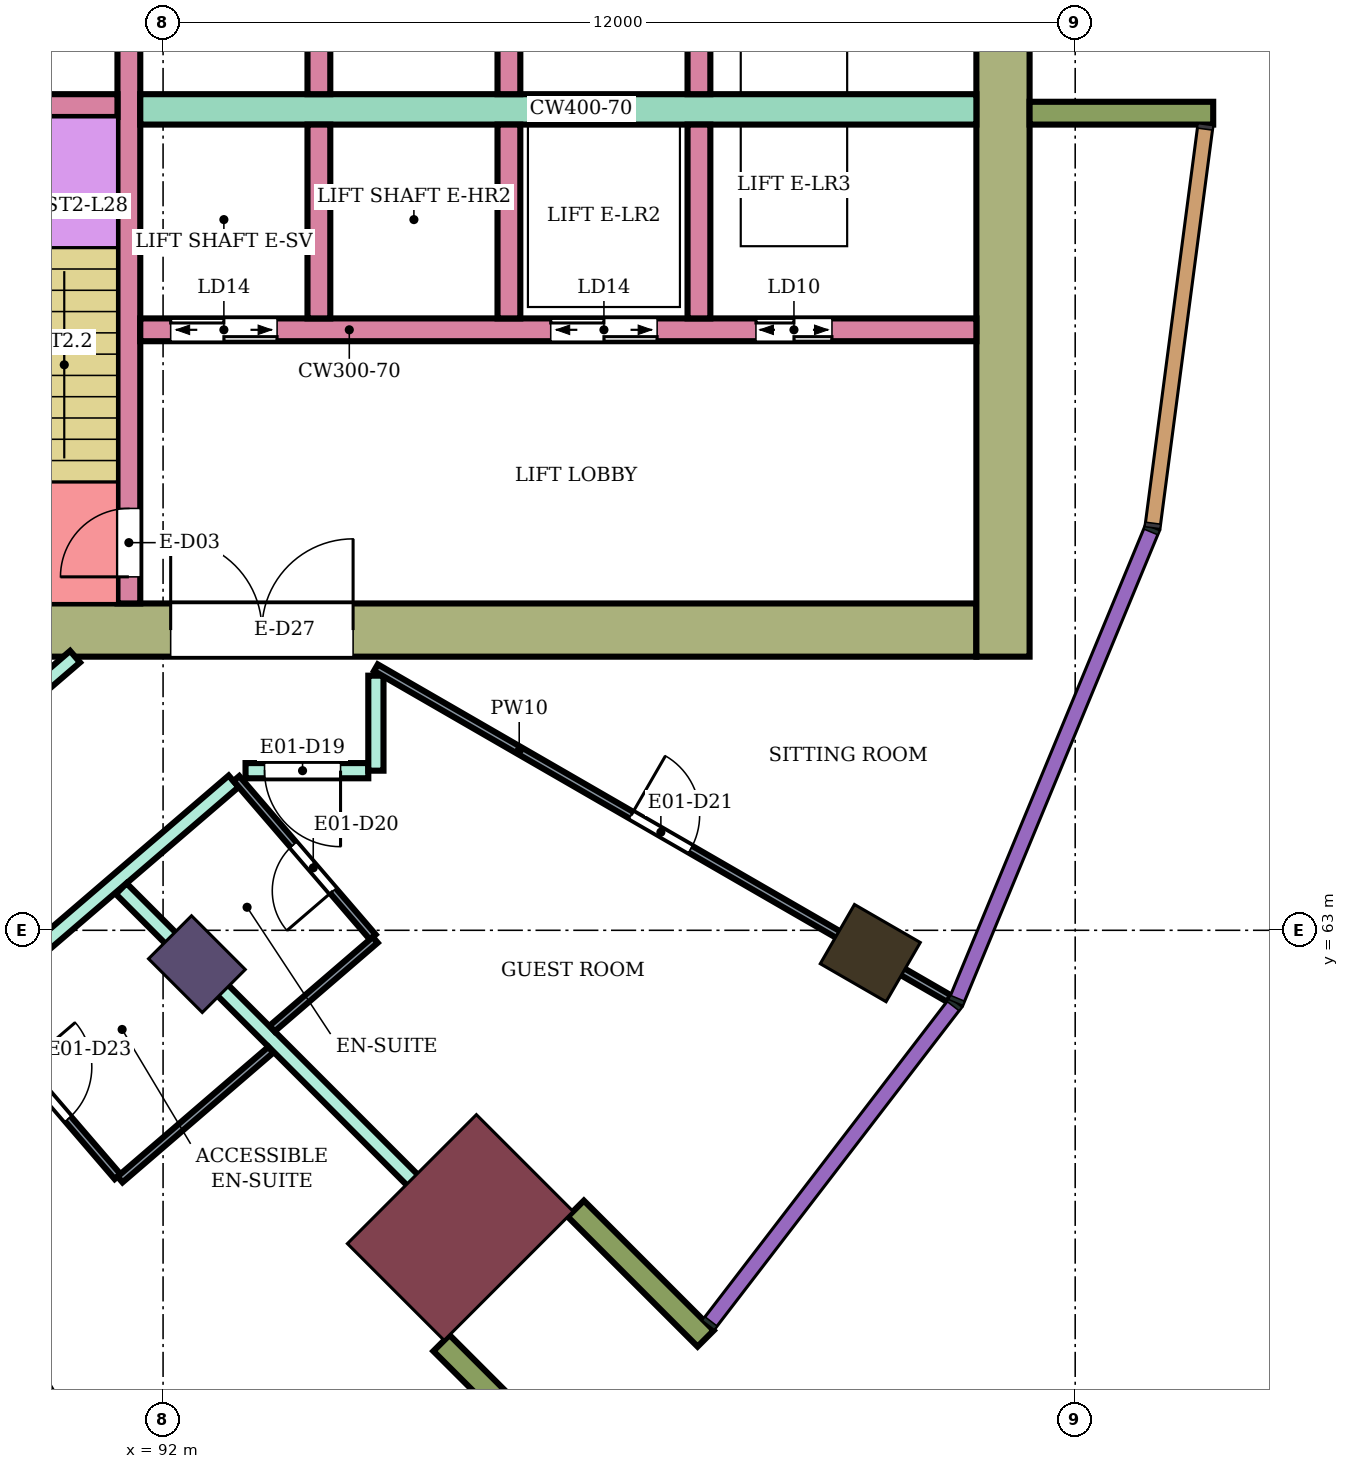
"""IFC4 building model, lengths in metres.
Left out: names, types, materials, properties, quantities, classifications, styles, units other than length and angle.
Written with IfcOpenShell. Run it as: python <this file> out.ifc"""

import sys

from ifc_helpers import new_model, si_unit, direction, frame, frame_2d, origin, origin_2d, place, context, subcontext, project, spatial, rectangle, extrude, element, fill, save


model = new_model("IFC4")
c1 = context("Model", 3, precision=1e-05, world=origin(), true_north=direction((0.0, 1.0)))
c2 = subcontext(c1, "Body", "Model", "MODEL_VIEW")
j1 = project(units=[si_unit("LENGTHUNIT", "METRE"), si_unit("PLANEANGLEUNIT", "RADIAN")], contexts=[c1])
p1 = place(None, origin())
s1 = spatial("IfcSite", under=j1, at=p1, CompositionType="ELEMENT")
p2 = place(p1, origin())
s2 = spatial("IfcBuilding", under=s1, at=p2, CompositionType="ELEMENT")
p3 = place(p2, frame((0.0, 0.0, 122.4)))
s3 = spatial("IfcBuildingStorey", under=s2, at=p3, CompositionType="ELEMENT", Elevation=122.4)
p4 = place(p3, frame((101.304, 62.7, 0.0), z_axis=(0.0, 0.0, 1.0), x_axis=(0.866025403784, -0.5, 0.0)))
e1 = element("IfcColumn", 1, at=p4, inside=s3, PredefinedType="COLUMN", context=c2, shape_type="SweptSolid", body=[
    extrude(rectangle(XDim=1.0, YDim=0.9, at=origin_2d()), origin(), (0.0, 0.0, 1.0), 3.9),
])
p5 = place(p3, frame((92.445, 62.555, 0.0), z_axis=(0.0, 0.0, 1.0), x_axis=(0.707106781187, -0.707106781187, 0.0)))
e2 = element("IfcColumn", 2, at=p5, inside=s3, PredefinedType="COLUMN", context=c2, shape_type="SweptSolid", body=[
    extrude(rectangle(XDim=1.0, YDim=0.8, at=origin_2d()), origin(), (0.0, 0.0, 1.0), 3.9),
])
p6 = place(p3, frame((95.91, 59.09, 0.0), z_axis=(0.0, 0.0, 1.0), x_axis=(0.707106781187, -0.707106781187, 0.0)))
e3 = element("IfcColumn", 3, at=p6, inside=s3, PredefinedType="COLUMN", context=c2, shape_type="SweptSolid", body=[
    extrude(rectangle(XDim=1.8, YDim=2.4, at=origin_2d()), origin(), (0.0, 0.0, 1.0), 3.9),
])
p7 = place(p3, frame((87.9, 66.95, 0.0), z_axis=(0.0, 0.0, 1.0), x_axis=(1.0, 0.0, 0.0)))
e4 = element("IfcWall", 4, at=p7, inside=s3, PredefinedType="SHEAR", context=c2, shape_type="SweptSolid", body=[
    extrude(rectangle(XDim=14.8, YDim=0.7, at=frame_2d((7.4, 0.0))), origin(), (0.0, 0.0, 1.0), 3.58),
])
p8 = place(p7, frame((4.2, 0.0, 0.0)))
e5 = element("IfcOpeningElement", 5, at=p8, cuts=e4, PredefinedType="OPENING", context=c2, shape_type="SweptSolid", body=[
    extrude(rectangle(XDim=2.4, YDim=2.4, at=frame_2d((1.2, 1.2))), frame((0.0, 0.36, 0.0), z_axis=(0.0, -1.0, 0.0), x_axis=(1.0, 0.0, 0.0)), (0.0, 0.0, 1.0), 0.72),
])
p9 = place(p3, frame((103.05, 66.6, 0.0), z_axis=(0.0, 0.0, 1.0), x_axis=(0.0, 1.0, 0.0)))
e6 = element("IfcWall", 6, at=p9, inside=s3, PredefinedType="SHEAR", context=c2, shape_type="SweptSolid", body=[
    extrude(rectangle(XDim=16.8, YDim=0.7, at=frame_2d((8.4, 0.0))), origin(), (0.0, 0.0, 1.0), 3.58),
])
p10 = place(p3, frame((91.55, 67.3, 0.0), z_axis=(0.0, 0.0, 1.0), x_axis=(0.0, 1.0, 0.0)))
e7 = element("IfcWall", 7, at=p10, inside=s3, PredefinedType="SHEAR", context=c2, shape_type="SweptSolid", body=[
    extrude(rectangle(XDim=7.7, YDim=0.3, at=frame_2d((3.85, 0.0))), origin(), (0.0, 0.0, 1.0), 3.58),
])
p11 = place(p10, frame((0.35, 0.0, 0.0)))
e8 = element("IfcOpeningElement", 8, at=p11, cuts=e7, PredefinedType="OPENING", context=c2, shape_type="SweptSolid", body=[
    extrude(rectangle(XDim=0.9, YDim=2.1, at=frame_2d((0.45, 1.05))), frame((0.0, 0.16, 0.0), z_axis=(0.0, -1.0, 0.0), x_axis=(1.0, 0.0, 0.0)), (0.0, 0.0, 1.0), 0.32),
])
p12 = place(p3, frame((88.35, 73.85, 0.0), z_axis=(0.0, 0.0, 1.0), x_axis=(1.0, 0.0, 0.0)))
e9 = element("IfcWall", 9, at=p12, inside=s3, PredefinedType="SHEAR", context=c2, shape_type="SweptSolid", body=[
    extrude(rectangle(XDim=3.05, YDim=0.3, at=frame_2d((1.525, 0.0))), origin(), (0.0, 0.0, 1.0), 3.58),
])
p13 = place(p3, frame((91.7, 73.8, 0.0), z_axis=(0.0, 0.0, 1.0), x_axis=(1.0, 0.0, 0.0)))
e10 = element("IfcWall", 10, at=p13, inside=s3, PredefinedType="SHEAR", context=c2, shape_type="SweptSolid", body=[
    extrude(rectangle(XDim=11.0, YDim=0.4, at=frame_2d((5.5, 0.0))), origin(), (0.0, 0.0, 1.0), 3.58),
])
p14 = place(p3, frame((91.7, 70.9, 0.0), z_axis=(0.0, 0.0, 1.0), x_axis=(1.0, 0.0, 0.0)))
e11 = element("IfcWall", 11, at=p14, inside=s3, PredefinedType="SHEAR", context=c2, shape_type="SweptSolid", body=[
    extrude(rectangle(XDim=11.0, YDim=0.3, at=frame_2d((5.5, 0.0))), origin(), (0.0, 0.0, 1.0), 3.58),
])
p15 = place(p14, frame((0.4, 0.0, 0.0)))
e12 = element("IfcOpeningElement", 12, at=p15, cuts=e11, PredefinedType="OPENING", context=c2, shape_type="SweptSolid", body=[
    extrude(rectangle(XDim=1.4, YDim=2.1, at=frame_2d((0.7, 1.05))), frame((0.0, 0.16, 0.0), z_axis=(0.0, -1.0, 0.0), x_axis=(1.0, 0.0, 0.0)), (0.0, 0.0, 1.0), 0.32),
])
p16 = place(p14, frame((5.4, 0.0, 0.0)))
e13 = element("IfcOpeningElement", 13, at=p16, cuts=e11, PredefinedType="OPENING", context=c2, shape_type="SweptSolid", body=[
    extrude(rectangle(XDim=1.4, YDim=2.1, at=frame_2d((0.7, 1.05))), frame((0.0, 0.16, 0.0), z_axis=(0.0, -1.0, 0.0), x_axis=(1.0, 0.0, 0.0)), (0.0, 0.0, 1.0), 0.32),
])
p17 = place(p14, frame((8.1, 0.0, 0.0)))
e14 = element("IfcOpeningElement", 14, at=p17, cuts=e11, PredefinedType="OPENING", context=c2, shape_type="SweptSolid", body=[
    extrude(rectangle(XDim=1.0, YDim=2.1, at=frame_2d((0.5, 1.05))), frame((0.0, 0.16, 0.0), z_axis=(0.0, -1.0, 0.0), x_axis=(1.0, 0.0, 0.0)), (0.0, 0.0, 1.0), 0.32),
])
for number, where, z_axis, x_axis in (
    (15, (94.05, 74.0, 0.0), (0.0, 0.0, 1.0), (0.0, 1.0, 0.0)),
    (16, (96.55, 74.0, 0.0), (0.0, 0.0, 1.0), (0.0, 1.0, 0.0)),
    (17, (99.05, 74.0, 0.0), (0.0, 0.0, 1.0), (0.0, 1.0, 0.0)),
    (18, (94.05, 71.05, 0.0), (0.0, 0.0, 1.0), (0.0, 1.0, 0.0)),
    (19, (96.55, 71.05, 0.0), (0.0, 0.0, 1.0), (0.0, 1.0, 0.0)),
    (20, (99.05, 71.05, 0.0), (0.0, 0.0, 1.0), (0.0, 1.0, 0.0)),
):
    element("IfcWall", number, at=place(p3, frame(where, z_axis=z_axis, x_axis=x_axis)), inside=s3, PredefinedType="SHEAR", context=c2, shape_type="SweptSolid", body=[
        extrude(rectangle(XDim=2.55, YDim=0.3, at=frame_2d((1.275, 0.0))), origin(), (0.0, 0.0, 1.0), 3.58),
    ])
for number, where, z_axis, x_axis in (
    (21, (103.4, 73.75, 0.0), (0.0, 0.0, 1.0), (1.0, 0.0, 0.0)),
    (22, (95.662, 57.57, 0.0), (0.0, 0.0, 1.0), (0.707, -0.707, 0.0)),
    (23, (97.43, 59.338, 0.0), (0.0, 0.0, 1.0), (0.707, -0.707, 0.0)),
):
    element("IfcWall", number, at=place(p3, frame(where, z_axis=z_axis, x_axis=x_axis)), inside=s3, PredefinedType="NOTDEFINED", context=c2, shape_type="SweptSolid", body=[
        extrude(rectangle(XDim=2.416, YDim=0.3, at=frame_2d((1.208, 0.0))), origin(), (0.0, 0.0, 1.0), 3.9),
    ])
p18 = place(p3, frame((86.877, 63.189, 0.0), z_axis=(0.0, 0.0, 1.0), x_axis=(0.758075808328, 0.652166442581, 0.0)))
e24 = element("IfcWall", 24, at=p18, inside=s3, PredefinedType="PARTITIONING", context=c2, shape_type="SweptSolid", body=[
    extrude(rectangle(XDim=5.23, YDim=0.2, at=frame_2d((2.615, 0.0))), origin(), (0.0, 0.0, 1.0), 3.45),
])
p19 = place(p18, frame((2.165, 0.0, 0.0)))
e25 = element("IfcOpeningElement", 25, at=p19, cuts=e24, PredefinedType="OPENING", context=c2, shape_type="SweptSolid", body=[
    extrude(rectangle(XDim=0.9, YDim=2.1, at=frame_2d((0.45, 1.05))), frame((0.0, 0.11, 0.0), z_axis=(0.0, -1.0, 0.0), x_axis=(1.0, 0.0, 0.0)), (0.0, 0.0, 1.0), 0.22),
])
p20 = place(p3, frame((88.235, 60.931, 0.0), z_axis=(0.0, 0.0, 1.0), x_axis=(0.758816241808, 0.651304775945, 0.0)))
e26 = element("IfcWall", 26, at=p20, inside=s3, PredefinedType="PARTITIONING", context=c2, shape_type="SweptSolid", body=[
    extrude(rectangle(XDim=6.186, YDim=0.2, at=frame_2d((3.093, 0.0))), origin(), (0.0, 0.0, 1.0), 3.45),
])
p21 = place(p20, frame((0.308, 0.0, 0.0)))
e27 = element("IfcOpeningElement", 27, at=p21, cuts=e26, PredefinedType="OPENING", context=c2, shape_type="SweptSolid", body=[
    extrude(rectangle(XDim=1.1, YDim=2.1, at=frame_2d((0.55, 1.05))), frame((0.0, 0.11, 0.0), z_axis=(0.0, -1.0, 0.0), x_axis=(1.0, 0.0, 0.0)), (0.0, 0.0, 1.0), 0.22),
])
p22 = place(p3, frame((88.159, 60.863, 0.0), z_axis=(0.0, 0.0, 1.0), x_axis=(0.499935840196, -0.866062443296, 0.0)))
e28 = element("IfcWall", 28, at=p22, inside=s3, PredefinedType="PARTITIONING", context=c2, shape_type="SweptSolid", body=[
    extrude(rectangle(XDim=9.475, YDim=0.2, at=frame_2d((4.737, 0.0))), origin(), (0.0, 0.0, 1.0), 3.45),
])
p23 = place(p3, frame((91.449, 63.548, 0.0), z_axis=(0.0, 0.0, 1.0), x_axis=(0.706984804638, -0.707228736698, 0.0)))
e29 = element("IfcWall", 29, at=p23, inside=s3, PredefinedType="PARTITIONING", context=c2, shape_type="SweptSolid", body=[
    extrude(rectangle(XDim=7.006, YDim=0.2, at=frame_2d((3.503, 0.0))), origin(), (0.0, 0.0, 1.0), 3.45),
])
p24 = place(p3, frame((93.085, 65.1, 0.0), z_axis=(0.0, 0.0, 1.0), x_axis=(1.0, 0.0, 0.0)))
e30 = element("IfcWall", 30, at=p24, inside=s3, PredefinedType="PARTITIONING", context=c2, shape_type="SweptSolid", body=[
    extrude(rectangle(XDim=1.615, YDim=0.2, at=frame_2d((0.808, 0.0))), origin(), (0.0, 0.0, 1.0), 3.45),
])
p25 = place(p24, frame((0.25, 0.0, 0.0)))
e31 = element("IfcOpeningElement", 31, at=p25, cuts=e30, PredefinedType="OPENING", context=c2, shape_type="SweptSolid", body=[
    extrude(rectangle(XDim=1.0, YDim=2.1, at=frame_2d((0.5, 1.05))), frame((0.0, 0.11, 0.0), z_axis=(0.0, -1.0, 0.0), x_axis=(1.0, 0.0, 0.0)), (0.0, 0.0, 1.0), 0.22),
])
p26 = place(p3, frame((94.8, 65.1, 0.0), z_axis=(0.0, 0.0, 1.0), x_axis=(0.0, 1.0, 0.0)))
e32 = element("IfcWall", 32, at=p26, inside=s3, PredefinedType="PARTITIONING", context=c2, shape_type="SweptSolid", body=[
    extrude(rectangle(XDim=1.25, YDim=0.2, at=frame_2d((0.625, 0.0))), origin(), (0.0, 0.0, 1.0), 3.45),
])
p27 = place(p3, frame((89.543, 61.921, 0.0), z_axis=(0.0, 0.0, 1.0), x_axis=(0.651996917864, -0.758221616083, 0.0)))
e33 = element("IfcWall", 33, at=p27, inside=s3, PredefinedType="PARTITIONING", context=c2, shape_type="SweptSolid", body=[
    extrude(rectangle(XDim=2.85, YDim=0.1, at=frame_2d((1.425, 0.0))), origin(), (0.0, 0.0, 1.0), 3.45),
])
p28 = place(p27, frame((0.95, 0.0, 0.0)))
e34 = element("IfcOpeningElement", 34, at=p28, cuts=e33, PredefinedType="OPENING", context=c2, shape_type="SweptSolid", body=[
    extrude(rectangle(XDim=0.9, YDim=2.1, at=frame_2d((0.45, 1.05))), frame((0.0, 0.06, 0.0), z_axis=(0.0, -1.0, 0.0), x_axis=(1.0, 0.0, 0.0)), (0.0, 0.0, 1.0), 0.12),
])
p29 = place(p3, frame((91.434, 59.722, 0.0), z_axis=(0.0, 0.0, 1.0), x_axis=(0.758076316785, 0.652165851552, 0.0)))
e35 = element("IfcWall", 35, at=p29, inside=s3, PredefinedType="PARTITIONING", context=c2, shape_type="SweptSolid", body=[
    extrude(rectangle(XDim=2.616, YDim=0.1, at=frame_2d((1.308, 0.0))), origin(), (0.0, 0.0, 1.0), 3.45),
])
p30 = place(p3, frame((92.965, 64.997, 0.0), z_axis=(0.0, 0.0, 1.0), x_axis=(0.652069888227, -0.758158862553, 0.0)))
e36 = element("IfcWall", 36, at=p30, inside=s3, PredefinedType="PARTITIONING", context=c2, shape_type="SweptSolid", body=[
    extrude(rectangle(XDim=2.75, YDim=0.1, at=frame_2d((1.375, 0.0))), origin(), (0.0, 0.0, 1.0), 3.45),
])
p31 = place(p30, frame((1.15, 0.0, 0.0)))
e37 = element("IfcOpeningElement", 37, at=p31, cuts=e36, PredefinedType="OPENING", context=c2, shape_type="SweptSolid", body=[
    extrude(rectangle(XDim=0.8, YDim=2.1, at=frame_2d((0.4, 1.05))), frame((0.0, 0.06, 0.0), z_axis=(0.0, -1.0, 0.0), x_axis=(1.0, 0.0, 0.0)), (0.0, 0.0, 1.0), 0.12),
])
p32 = place(p3, frame((93.435, 61.707, 0.0), z_axis=(0.0, 0.0, 1.0), x_axis=(0.758070495124, 0.652172618578, 0.0)))
e38 = element("IfcWall", 38, at=p32, inside=s3, PredefinedType="PARTITIONING", context=c2, shape_type="SweptSolid", body=[
    extrude(rectangle(XDim=1.789, YDim=0.1, at=frame_2d((0.895, 0.0))), origin(), (0.0, 0.0, 1.0), 3.45),
])
p33 = place(p3, frame((94.8, 66.455, 0.0), z_axis=(0.0, 0.0, 1.0), x_axis=(0.86602264145, -0.500004784474, 0.0)))
e39 = element("IfcWall", 39, at=p33, inside=s3, PredefinedType="PARTITIONING", context=c2, shape_type="SweptSolid", body=[
    extrude(rectangle(XDim=8.708, YDim=0.1, at=frame_2d((4.354, 0.0))), origin(), (0.0, 0.0, 1.0), 3.45),
])
p34 = place(p33, frame((3.879, 0.0, 0.0)))
e40 = element("IfcOpeningElement", 40, at=p34, cuts=e39, PredefinedType="OPENING", context=c2, shape_type="SweptSolid", body=[
    extrude(rectangle(XDim=0.9, YDim=2.1, at=frame_2d((0.45, 1.05))), frame((0.0, 0.06, 0.0), z_axis=(0.0, -1.0, 0.0), x_axis=(1.0, 0.0, 0.0)), (0.0, 0.0, 1.0), 0.12),
])
p35 = place(p25, frame((1.0, 0.0, 0.0), z_axis=(0.0, 0.0, 1.0), x_axis=(-1.0, 0.0, 0.0)))
e41 = element("IfcDoor", 41, at=p35, inside=s3, OperationType="SINGLE_SWING_LEFT", PredefinedType="DOOR", context=c2, shape_type="SweptSolid", body=[
    extrude(rectangle(XDim=1.0, YDim=2.1, at=frame_2d((0.5, 1.05))), frame((0.0, 0.025, 0.0), z_axis=(0.0, -1.0, 0.0), x_axis=(1.0, 0.0, 0.0)), (0.0, 0.0, 1.0), 0.05),
])
fill(e31, e41)
p36 = place(p31, frame((0.8, 0.0, 0.0), z_axis=(0.0, 0.0, 1.0), x_axis=(-1.0, 0.0, 0.0)))
e42 = element("IfcDoor", 42, at=p36, inside=s3, OperationType="SINGLE_SWING_LEFT", PredefinedType="DOOR", context=c2, shape_type="SweptSolid", body=[
    extrude(rectangle(XDim=0.8, YDim=2.1, at=frame_2d((0.4, 1.05))), frame((0.0, 0.025, 0.0), z_axis=(0.0, -1.0, 0.0), x_axis=(1.0, 0.0, 0.0)), (0.0, 0.0, 1.0), 0.05),
])
fill(e37, e42)
p37 = place(p34, origin())
e43 = element("IfcDoor", 43, at=p37, inside=s3, OperationType="SINGLE_SWING_LEFT", PredefinedType="DOOR", context=c2, shape_type="SweptSolid", body=[
    extrude(rectangle(XDim=0.9, YDim=2.1, at=frame_2d((0.45, 1.05))), frame((0.0, 0.025, 0.0), z_axis=(0.0, -1.0, 0.0), x_axis=(1.0, 0.0, 0.0)), (0.0, 0.0, 1.0), 0.05),
])
fill(e40, e43)
p38 = place(p28, origin())
e44 = element("IfcDoor", 44, at=p38, inside=s3, OperationType="SINGLE_SWING_LEFT", PredefinedType="DOOR", context=c2, shape_type="SweptSolid", body=[
    extrude(rectangle(XDim=0.9, YDim=2.1, at=frame_2d((0.45, 1.05))), frame((0.0, 0.025, 0.0), z_axis=(0.0, -1.0, 0.0), x_axis=(1.0, 0.0, 0.0)), (0.0, 0.0, 1.0), 0.05),
])
fill(e34, e44)
p39 = place(p11, origin())
e45 = element("IfcDoor", 45, at=p39, inside=s3, OperationType="SINGLE_SWING_LEFT", PredefinedType="DOOR", context=c2, shape_type="SweptSolid", body=[
    extrude(rectangle(XDim=0.9, YDim=2.1, at=frame_2d((0.45, 1.05))), frame((0.0, 0.025, 0.0), z_axis=(0.0, -1.0, 0.0), x_axis=(1.0, 0.0, 0.0)), (0.0, 0.0, 1.0), 0.05),
])
fill(e8, e45)
p40 = place(p15, origin())
e46 = element("IfcDoor", 46, at=p40, inside=s3, OperationType="DOUBLE_DOOR_SLIDING", PredefinedType="DOOR", context=c2, shape_type="SweptSolid", body=[
    extrude(rectangle(XDim=1.4, YDim=2.1, at=frame_2d((0.7, 1.05))), frame((0.0, 0.025, 0.0), z_axis=(0.0, -1.0, 0.0), x_axis=(1.0, 0.0, 0.0)), (0.0, 0.0, 1.0), 0.05),
])
fill(e12, e46)
p41 = place(p16, origin())
e47 = element("IfcDoor", 47, at=p41, inside=s3, OperationType="DOUBLE_DOOR_SLIDING", PredefinedType="DOOR", context=c2, shape_type="SweptSolid", body=[
    extrude(rectangle(XDim=1.4, YDim=2.1, at=frame_2d((0.7, 1.05))), frame((0.0, 0.025, 0.0), z_axis=(0.0, -1.0, 0.0), x_axis=(1.0, 0.0, 0.0)), (0.0, 0.0, 1.0), 0.05),
])
fill(e13, e47)
p42 = place(p17, origin())
e48 = element("IfcDoor", 48, at=p42, inside=s3, OperationType="DOUBLE_DOOR_SLIDING", PredefinedType="DOOR", context=c2, shape_type="SweptSolid", body=[
    extrude(rectangle(XDim=1.0, YDim=2.1, at=frame_2d((0.5, 1.05))), frame((0.0, 0.025, 0.0), z_axis=(0.0, -1.0, 0.0), x_axis=(1.0, 0.0, 0.0)), (0.0, 0.0, 1.0), 0.05),
])
fill(e14, e48)
p43 = place(p8, origin())
e49 = element("IfcDoor", 49, at=p43, inside=s3, OperationType="DOUBLE_DOOR_SINGLE_SWING", PredefinedType="DOOR", context=c2, shape_type="SweptSolid", body=[
    extrude(rectangle(XDim=2.4, YDim=2.4, at=frame_2d((1.2, 1.2))), frame((0.0, 0.025, 0.0), z_axis=(0.0, -1.0, 0.0), x_axis=(1.0, 0.0, 0.0)), (0.0, 0.0, 1.0), 0.05),
])
fill(e5, e49)
save(model, sys.argv[1])
